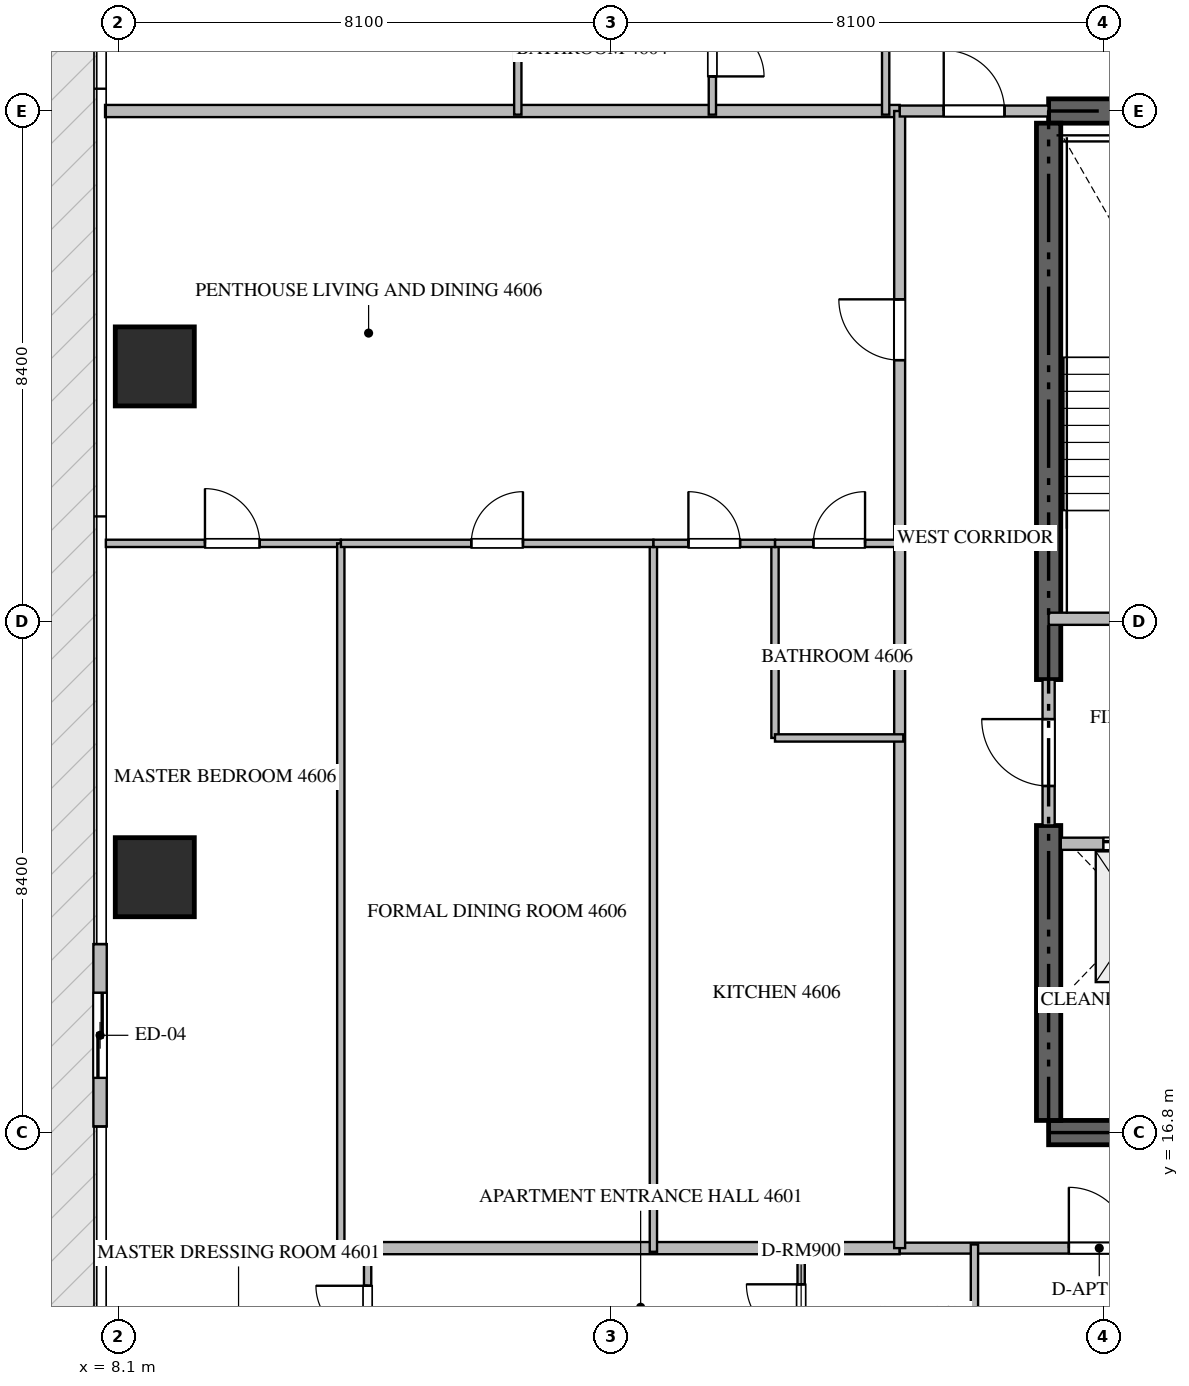
"""IFC4 building model, lengths in metres.
Left out: names, types, materials, properties, quantities, classifications, styles, units other than length and angle.
Written with IfcOpenShell. Run it as: python <this file> out.ifc"""

import sys

from ifc_helpers import new_model, si_unit, direction, frame, frame_2d, origin, origin_2d, place, context, subcontext, project, spatial, rectangle, extrude, source, transform, mapped, element, fill, save


model = new_model("IFC4")
c1 = context("Model", 3, precision=1e-05, world=origin(), true_north=direction((0.0, 1.0)))
c2 = subcontext(c1, "Body", "Model", "MODEL_VIEW")
j1 = project(units=[si_unit("LENGTHUNIT", "METRE"), si_unit("PLANEANGLEUNIT", "RADIAN")], contexts=[c1])
p1 = place(None, origin())
s1 = spatial("IfcSite", under=j1, at=p1, CompositionType="ELEMENT")
p2 = place(p1, origin())
s2 = spatial("IfcBuilding", under=s1, at=p2, CompositionType="ELEMENT")
p3 = place(p2, frame((0.0, 0.0, 183.9)))
s3 = spatial("IfcBuildingStorey", under=s2, at=p3, CompositionType="ELEMENT", Elevation=183.9)
for number, where, z_axis, x_axis in (
    (1, (23.4, 16.8, -0.26), (0.0, 0.0, 1.0), (1.0, 0.0, 0.0)),
    (2, (41.4, 33.6, -0.26), (0.0, 0.0, 1.0), (-1.0, 0.0, 0.0)),
):
    element("IfcWall", number, at=place(p3, frame(where, z_axis=z_axis, x_axis=x_axis)), inside=s3, PredefinedType="SHEAR", context=c2, shape_type="SweptSolid", body=[
        extrude(rectangle(XDim=18.0, YDim=0.4, at=frame_2d((9.0, 0.0))), origin(), (0.0, 0.0, 1.0), 3.748),
    ])
p4 = place(p3, frame((23.4, 17.0, -0.26), z_axis=(0.0, 0.0, 1.0), x_axis=(0.0, 1.0, 0.0)))
e3 = element("IfcWall", 3, at=p4, inside=s3, PredefinedType="SHEAR", context=c2, shape_type="SweptSolid", body=[
    extrude(rectangle(XDim=4.85, YDim=0.4, at=frame_2d((2.425, 0.0))), origin(), (0.0, 0.0, 1.0), 3.748),
])
p5 = place(p3, frame((23.4, 24.25, -0.26), z_axis=(0.0, 0.0, 1.0), x_axis=(0.0, 1.0, 0.0)))
e4 = element("IfcWall", 4, at=p5, inside=s3, PredefinedType="SHEAR", context=c2, shape_type="SweptSolid", body=[
    extrude(rectangle(XDim=9.15, YDim=0.4, at=frame_2d((4.575, 0.0))), origin(), (0.0, 0.0, 1.0), 3.748),
])
m1 = source(origin(), c2, "Body", "SweptSolid", [
    extrude(rectangle(XDim=1.3, YDim=1.3, at=origin_2d()), origin(), (0.0, 0.0, 1.0), 3.75),
])
for number, where, z_axis, x_axis in (
    (5, (8.7, 21.0, -0.26), (0.0, 0.0, 1.0), (1.0, 0.0, 0.0)),
    (6, (8.7, 29.4, -0.26), (0.0, 0.0, 1.0), (1.0, 0.0, 0.0)),
):
    element("IfcColumn", number, at=place(p3, frame(where, z_axis=z_axis, x_axis=x_axis)), inside=s3, PredefinedType="COLUMN", context=c2, shape_type="MappedRepresentation", body=[
        mapped(m1, transform((0.0, 0.0, 0.0), scale=1.0)),
    ])
p6 = place(p3, frame((7.8, 19.9, 0.0), z_axis=(0.0, 0.0, 1.0), x_axis=(0.0, -1.0, 0.0)))
e7 = element("IfcWall", 7, at=p6, inside=s3, PredefinedType="ELEMENTEDWALL", context=c2, shape_type="SweptSolid", body=[
    extrude(rectangle(XDim=3.0, YDim=0.22, at=frame_2d((1.5, 0.0))), origin(), (0.0, 0.0, 1.0), 3.475),
])
p7 = place(p6, frame((0.8, 0.0, 0.0)))
e8 = element("IfcOpeningElement", 8, at=p7, cuts=e7, PredefinedType="OPENING", context=c2, shape_type="SweptSolid", body=[
    extrude(rectangle(XDim=1.4, YDim=2.25, at=frame_2d((0.7, 1.125))), frame((0.0, 0.12, 0.0), z_axis=(0.0, -1.0, 0.0), x_axis=(1.0, 0.0, 0.0)), (0.0, 0.0, 1.0), 0.24),
])
p8 = place(p3, frame((23.4, 25.25, 0.0), z_axis=(0.0, 0.0, 1.0), x_axis=(1.0, 0.0, 0.0)))
e9 = element("IfcWall", 9, at=p8, inside=s3, PredefinedType="STANDARD", context=c2, shape_type="SweptSolid", body=[
    extrude(rectangle(XDim=4.45, YDim=0.2, at=frame_2d((2.225, 0.0))), origin(), (0.0, 0.0, 1.0), 3.49),
])
p9 = place(p8, frame((1.65, 0.0, 0.0)))
e10 = element("IfcOpeningElement", 10, at=p9, cuts=e9, PredefinedType="OPENING", context=c2, shape_type="SweptSolid", body=[
    extrude(rectangle(XDim=1.1, YDim=2.15, at=frame_2d((0.55, 1.075))), frame((0.0, 0.11, 0.0), z_axis=(0.0, -1.0, 0.0), x_axis=(1.0, 0.0, 0.0)), (0.0, 0.0, 1.0), 0.22),
])
p10 = place(p3, frame((23.6, 21.55, 0.0), z_axis=(0.0, 0.0, 1.0), x_axis=(1.0, 0.0, 0.0)))
e11 = element("IfcWall", 11, at=p10, inside=s3, PredefinedType="STANDARD", context=c2, shape_type="SweptSolid", body=[
    extrude(rectangle(XDim=2.45, YDim=0.2, at=frame_2d((1.225, 0.0))), origin(), (0.0, 0.0, 1.0), 3.49),
])
p11 = place(p10, frame((0.7, 0.0, 0.0)))
e12 = element("IfcOpeningElement", 12, at=p11, cuts=e11, PredefinedType="OPENING", context=c2, shape_type="SweptSolid", body=[
    extrude(rectangle(XDim=1.2, YDim=2.2, at=frame_2d((0.6, 1.1))), frame((0.0, 0.11, 0.0), z_axis=(0.0, -1.0, 0.0), x_axis=(1.0, 0.0, 0.0)), (0.0, 0.0, 1.0), 0.22),
])
p12 = place(p3, frame((23.6, 19.05, 0.0), z_axis=(0.0, 0.0, 1.0), x_axis=(1.0, 0.0, 0.0)))
e13 = element("IfcWall", 13, at=p12, inside=s3, PredefinedType="STANDARD", context=c2, shape_type="SweptSolid", body=[
    extrude(rectangle(XDim=2.45, YDim=0.2, at=frame_2d((1.225, 0.0))), origin(), (0.0, 0.0, 1.0), 3.49),
])
p13 = place(p3, frame((23.4, 21.852, 0.0), z_axis=(0.0, 0.0, 1.0), x_axis=(0.0, 1.0, 0.0)))
e14 = element("IfcWall", 14, at=p13, inside=s3, PredefinedType="STANDARD", context=c2, shape_type="SweptSolid", body=[
    extrude(rectangle(XDim=2.396, YDim=0.2, at=frame_2d((1.198, 0.0))), origin(), (0.0, 0.0, 1.0), 3.49),
])
p14 = place(p13, frame((0.648, 0.0, 0.0)))
e15 = element("IfcOpeningElement", 15, at=p14, cuts=e14, PredefinedType="OPENING", context=c2, shape_type="SweptSolid", body=[
    extrude(rectangle(XDim=1.1, YDim=2.15, at=frame_2d((0.55, 1.075))), frame((0.0, 0.11, 0.0), z_axis=(0.0, -1.0, 0.0), x_axis=(1.0, 0.0, 0.0)), (0.0, 0.0, 1.0), 0.22),
])
for number, where, z_axis, x_axis in (
    (16, (7.882, 14.9, 0.0), (0.0, 0.0, 1.0), (1.0, 0.0, 0.0)),
    (17, (7.882, 33.6, 0.0), (0.0, 0.0, 1.0), (1.0, 0.0, 0.0)),
):
    element("IfcWall", number, at=place(p3, frame(where, z_axis=z_axis, x_axis=x_axis)), inside=s3, PredefinedType="PARTITIONING", context=c2, shape_type="SweptSolid", body=[
        extrude(rectangle(XDim=13.068, YDim=0.2, at=frame_2d((6.534, 0.0))), origin(), (0.0, 0.0, 1.0), 3.49),
    ])
p15 = place(p3, frame((20.952, 14.9, 0.0), z_axis=(0.0, 0.0, 1.0), x_axis=(1.0, 0.0, 0.0)))
e18 = element("IfcWall", 18, at=p15, inside=s3, PredefinedType="PARTITIONING", context=c2, shape_type="SweptSolid", body=[
    extrude(rectangle(XDim=22.896, YDim=0.18, at=frame_2d((11.448, 0.0))), origin(), (0.0, 0.0, 1.0), 3.49),
])
p16 = place(p15, frame((2.781, 0.0, 0.0)))
e19 = element("IfcOpeningElement", 19, at=p16, cuts=e18, PredefinedType="OPENING", context=c2, shape_type="SweptSolid", body=[
    extrude(rectangle(XDim=1.0, YDim=2.15, at=frame_2d((0.5, 1.075))), frame((0.0, 0.1, 0.0), z_axis=(0.0, -1.0, 0.0), x_axis=(1.0, 0.0, 0.0)), (0.0, 0.0, 1.0), 0.2),
])
p17 = place(p15, frame((14.736, 0.0, 0.0)))
e20 = element("IfcOpeningElement", 20, at=p17, cuts=e18, PredefinedType="OPENING", context=c2, shape_type="SweptSolid", body=[
    extrude(rectangle(XDim=1.0, YDim=2.15, at=frame_2d((0.5, 1.075))), frame((0.0, 0.1, 0.0), z_axis=(0.0, -1.0, 0.0), x_axis=(1.0, 0.0, 0.0)), (0.0, 0.0, 1.0), 0.2),
])
p18 = place(p15, frame((19.115, 0.0, 0.0)))
e21 = element("IfcOpeningElement", 21, at=p18, cuts=e18, PredefinedType="OPENING", context=c2, shape_type="SweptSolid", body=[
    extrude(rectangle(XDim=1.0, YDim=2.15, at=frame_2d((0.5, 1.075))), frame((0.0, 0.1, 0.0), z_axis=(0.0, -1.0, 0.0), x_axis=(1.0, 0.0, 0.0)), (0.0, 0.0, 1.0), 0.2),
])
p19 = place(p3, frame((20.95, 14.9, 0.0), z_axis=(0.0, 0.0, 1.0), x_axis=(0.0, 1.0, 0.0)))
e22 = element("IfcWall", 22, at=p19, inside=s3, PredefinedType="PARTITIONING", context=c2, shape_type="SweptSolid", body=[
    extrude(rectangle(XDim=18.7, YDim=0.18, at=frame_2d((9.35, 0.0))), origin(), (0.0, 0.0, 1.0), 3.49),
])
p20 = place(p19, frame((14.603, 0.0, 0.0)))
e23 = element("IfcOpeningElement", 23, at=p20, cuts=e22, PredefinedType="OPENING", context=c2, shape_type="SweptSolid", body=[
    extrude(rectangle(XDim=1.0, YDim=2.15, at=frame_2d((0.5, 1.075))), frame((0.0, 0.1, 0.0), z_axis=(0.0, -1.0, 0.0), x_axis=(1.0, 0.0, 0.0)), (0.0, 0.0, 1.0), 0.2),
])
p21 = place(p3, frame((20.952, 33.6, 0.0), z_axis=(0.0, 0.0, 1.0), x_axis=(1.0, 0.0, 0.0)))
e24 = element("IfcWall", 24, at=p21, inside=s3, PredefinedType="PARTITIONING", context=c2, shape_type="SweptSolid", body=[
    extrude(rectangle(XDim=2.446, YDim=0.18, at=frame_2d((1.223, 0.0))), origin(), (0.0, 0.0, 1.0), 3.49),
])
p22 = place(p21, frame((0.723, 0.0, 0.0)))
e25 = element("IfcOpeningElement", 25, at=p22, cuts=e24, PredefinedType="OPENING", context=c2, shape_type="SweptSolid", body=[
    extrude(rectangle(XDim=1.0, YDim=2.15, at=frame_2d((0.5, 1.075))), frame((0.0, 0.1, 0.0), z_axis=(0.0, -1.0, 0.0), x_axis=(1.0, 0.0, 0.0)), (0.0, 0.0, 1.0), 0.2),
])
p23 = place(p3, frame((22.18, 12.15, 0.0), z_axis=(0.0, 0.0, 1.0), x_axis=(0.0, 1.0, 0.0)))
e26 = element("IfcWall", 26, at=p23, inside=s3, PredefinedType="PARTITIONING", context=c2, shape_type="SweptSolid", body=[
    extrude(rectangle(XDim=2.81, YDim=0.12, at=frame_2d((1.405, 0.0))), origin(), (0.0, 0.0, 1.0), 3.49),
])
p24 = place(p3, frame((19.33, 12.75, 0.0), z_axis=(0.0, 0.0, 1.0), x_axis=(0.0, 1.0, 0.0)))
e27 = element("IfcWall", 27, at=p24, inside=s3, PredefinedType="PARTITIONING", context=c2, shape_type="SweptSolid", body=[
    extrude(rectangle(XDim=2.21, YDim=0.12, at=frame_2d((1.105, 0.0))), origin(), (0.0, 0.0, 1.0), 3.49),
])
p25 = place(p24, frame((0.655, 0.0, 0.0)))
e28 = element("IfcOpeningElement", 28, at=p25, cuts=e27, PredefinedType="OPENING", context=c2, shape_type="SweptSolid", body=[
    extrude(rectangle(XDim=0.9, YDim=2.1, at=frame_2d((0.45, 1.05))), frame((0.0, 0.07, 0.0), z_axis=(0.0, -1.0, 0.0), x_axis=(1.0, 0.0, 0.0)), (0.0, 0.0, 1.0), 0.14),
])
p26 = place(p3, frame((12.2, 12.752, 0.0), z_axis=(0.0, 0.0, 1.0), x_axis=(0.0, 1.0, 0.0)))
e29 = element("IfcWall", 29, at=p26, inside=s3, PredefinedType="PARTITIONING", context=c2, shape_type="SweptSolid", body=[
    extrude(rectangle(XDim=2.208, YDim=0.12, at=frame_2d((1.104, 0.0))), origin(), (0.0, 0.0, 1.0), 3.49),
])
p27 = place(p26, frame((0.679, 0.0, 0.0)))
e30 = element("IfcOpeningElement", 30, at=p27, cuts=e29, PredefinedType="OPENING", context=c2, shape_type="SweptSolid", body=[
    extrude(rectangle(XDim=0.85, YDim=2.1, at=frame_2d((0.425, 1.05))), frame((0.0, 0.07, 0.0), z_axis=(0.0, -1.0, 0.0), x_axis=(1.0, 0.0, 0.0)), (0.0, 0.0, 1.0), 0.14),
])
p28 = place(p3, frame((20.72, 36.35, 0.0), z_axis=(0.0, 0.0, 1.0), x_axis=(0.0, -1.0, 0.0)))
e31 = element("IfcWall", 31, at=p28, inside=s3, PredefinedType="PARTITIONING", context=c2, shape_type="SweptSolid", body=[
    extrude(rectangle(XDim=2.81, YDim=0.12, at=frame_2d((1.405, 0.0))), origin(), (0.0, 0.0, 1.0), 3.49),
])
p29 = place(p3, frame((14.67, 35.65, 0.0), z_axis=(0.0, 0.0, 1.0), x_axis=(0.0, -1.0, 0.0)))
e32 = element("IfcWall", 32, at=p29, inside=s3, PredefinedType="PARTITIONING", context=c2, shape_type="SweptSolid", body=[
    extrude(rectangle(XDim=2.11, YDim=0.12, at=frame_2d((1.055, 0.0))), origin(), (0.0, 0.0, 1.0), 3.49),
])
p30 = place(p3, frame((17.87, 35.648, 0.0), z_axis=(0.0, 0.0, 1.0), x_axis=(0.0, -1.0, 0.0)))
e33 = element("IfcWall", 33, at=p30, inside=s3, PredefinedType="PARTITIONING", context=c2, shape_type="SweptSolid", body=[
    extrude(rectangle(XDim=2.108, YDim=0.12, at=frame_2d((1.054, 0.0))), origin(), (0.0, 0.0, 1.0), 3.49),
])
p31 = place(p30, frame((0.629, 0.0, 0.0)))
e34 = element("IfcOpeningElement", 34, at=p31, cuts=e33, PredefinedType="OPENING", context=c2, shape_type="SweptSolid", body=[
    extrude(rectangle(XDim=0.85, YDim=2.1, at=frame_2d((0.425, 1.05))), frame((0.0, 0.07, 0.0), z_axis=(0.0, -1.0, 0.0), x_axis=(1.0, 0.0, 0.0)), (0.0, 0.0, 1.0), 0.14),
])
p32 = place(p3, frame((7.895, 26.49, 0.0), z_axis=(0.0, 0.0, 1.0), x_axis=(1.0, 0.0, 0.0)))
e35 = element("IfcWall", 35, at=p32, inside=s3, PredefinedType="PARTITIONING", context=c2, shape_type="SweptSolid", body=[
    extrude(rectangle(XDim=3.864, YDim=0.12, at=frame_2d((1.932, 0.0))), origin(), (0.0, 0.0, 1.0), 3.49),
])
p33 = place(p32, frame((1.63, 0.0, 0.0)))
e36 = element("IfcOpeningElement", 36, at=p33, cuts=e35, PredefinedType="OPENING", context=c2, shape_type="SweptSolid", body=[
    extrude(rectangle(XDim=0.9, YDim=2.1, at=frame_2d((0.45, 1.05))), frame((0.0, 0.07, 0.0), z_axis=(0.0, -1.0, 0.0), x_axis=(1.0, 0.0, 0.0)), (0.0, 0.0, 1.0), 0.14),
])
p34 = place(p3, frame((11.759, 14.84, 0.0), z_axis=(0.0, 0.0, 1.0), x_axis=(0.0, 1.0, 0.0)))
e37 = element("IfcWall", 37, at=p34, inside=s3, PredefinedType="PARTITIONING", context=c2, shape_type="SweptSolid", body=[
    extrude(rectangle(XDim=11.65, YDim=0.12, at=frame_2d((5.825, 0.0))), origin(), (0.0, 0.0, 1.0), 3.49),
])
p35 = place(p3, frame((16.9, 14.84, 0.0), z_axis=(0.0, 0.0, 1.0), x_axis=(0.0, 1.0, 0.0)))
e38 = element("IfcWall", 38, at=p35, inside=s3, PredefinedType="PARTITIONING", context=c2, shape_type="SweptSolid", body=[
    extrude(rectangle(XDim=11.65, YDim=0.12, at=frame_2d((5.825, 0.0))), origin(), (0.0, 0.0, 1.0), 2.972),
])
p36 = place(p3, frame((18.9, 23.29, 0.0), z_axis=(0.0, 0.0, 1.0), x_axis=(0.0, 1.0, 0.0)))
e39 = element("IfcWall", 39, at=p36, inside=s3, PredefinedType="PARTITIONING", context=c2, shape_type="SweptSolid", body=[
    extrude(rectangle(XDim=3.2, YDim=0.12, at=frame_2d((1.6, 0.0))), origin(), (0.0, 0.0, 1.0), 3.49),
])
p37 = place(p3, frame((18.9, 23.29, 0.0), z_axis=(0.0, 0.0, 1.0), x_axis=(1.0, 0.0, 0.0)))
e40 = element("IfcWall", 40, at=p37, inside=s3, PredefinedType="PARTITIONING", context=c2, shape_type="SweptSolid", body=[
    extrude(rectangle(XDim=2.11, YDim=0.12, at=frame_2d((1.055, 0.0))), origin(), (0.0, 0.0, 1.0), 3.49),
])
p38 = place(p3, frame((11.761, 26.49, 0.0), z_axis=(0.0, 0.0, 1.0), x_axis=(1.0, 0.0, 0.0)))
e41 = element("IfcWall", 41, at=p38, inside=s3, PredefinedType="PARTITIONING", context=c2, shape_type="SweptSolid", body=[
    extrude(rectangle(XDim=5.139, YDim=0.12, at=frame_2d((2.569, 0.0))), origin(), (0.0, 0.0, 1.0), 3.49),
])
p39 = place(p38, frame((2.144, 0.0, 0.0)))
e42 = element("IfcOpeningElement", 42, at=p39, cuts=e41, PredefinedType="OPENING", context=c2, shape_type="SweptSolid", body=[
    extrude(rectangle(XDim=0.85, YDim=2.1, at=frame_2d((0.425, 1.05))), frame((0.0, 0.07, 0.0), z_axis=(0.0, -1.0, 0.0), x_axis=(1.0, 0.0, 0.0)), (0.0, 0.0, 1.0), 0.14),
])
p40 = place(p3, frame((16.902, 26.49, 0.0), z_axis=(0.0, 0.0, 1.0), x_axis=(1.0, 0.0, 0.0)))
e43 = element("IfcWall", 43, at=p40, inside=s3, PredefinedType="PARTITIONING", context=c2, shape_type="SweptSolid", body=[
    extrude(rectangle(XDim=1.998, YDim=0.12, at=frame_2d((0.999, 0.0))), origin(), (0.0, 0.0, 1.0), 3.49),
])
p41 = place(p40, frame((0.574, 0.0, 0.0)))
e44 = element("IfcOpeningElement", 44, at=p41, cuts=e43, PredefinedType="OPENING", context=c2, shape_type="SweptSolid", body=[
    extrude(rectangle(XDim=0.85, YDim=2.1, at=frame_2d((0.425, 1.05))), frame((0.0, 0.07, 0.0), z_axis=(0.0, -1.0, 0.0), x_axis=(1.0, 0.0, 0.0)), (0.0, 0.0, 1.0), 0.14),
])
p42 = place(p3, frame((18.902, 26.49, 0.0), z_axis=(0.0, 0.0, 1.0), x_axis=(1.0, 0.0, 0.0)))
e45 = element("IfcWall", 45, at=p42, inside=s3, PredefinedType="PARTITIONING", context=c2, shape_type="SweptSolid", body=[
    extrude(rectangle(XDim=2.108, YDim=0.12, at=frame_2d((1.054, 0.0))), origin(), (0.0, 0.0, 1.0), 3.49),
])
p43 = place(p42, frame((0.629, 0.0, 0.0)))
e46 = element("IfcOpeningElement", 46, at=p43, cuts=e45, PredefinedType="OPENING", context=c2, shape_type="SweptSolid", body=[
    extrude(rectangle(XDim=0.85, YDim=2.1, at=frame_2d((0.425, 1.05))), frame((0.0, 0.07, 0.0), z_axis=(0.0, -1.0, 0.0), x_axis=(1.0, 0.0, 0.0)), (0.0, 0.0, 1.0), 0.14),
])
m2 = source(origin(), c2, "Body", "SweptSolid", [
    extrude(rectangle(XDim=1.4, YDim=2.25, at=frame_2d((0.7, 1.125))), frame((0.0, 0.025, 0.0), z_axis=(0.0, -1.0, 0.0), x_axis=(1.0, 0.0, 0.0)), (0.0, 0.0, 1.0), 0.05),
])
p44 = place(p7, origin())
e47 = element("IfcDoor", 47, at=p44, inside=s3, OperationType="SLIDING_TO_LEFT", PredefinedType="DOOR", context=c2, shape_type="MappedRepresentation", body=[
    mapped(m2, transform((0.0, 0.0, 0.0), scale=1.0)),
])
fill(e8, e47)
m3 = source(origin(), c2, "Body", "SweptSolid", [
    extrude(rectangle(XDim=1.2, YDim=2.2, at=frame_2d((0.6, 1.1))), frame((0.0, 0.025, 0.0), z_axis=(0.0, -1.0, 0.0), x_axis=(1.0, 0.0, 0.0)), (0.0, 0.0, 1.0), 0.05),
])
p45 = place(p11, origin())
e48 = element("IfcDoor", 48, at=p45, inside=s3, OperationType="DOUBLE_DOOR_SLIDING", PredefinedType="DOOR", context=c2, shape_type="MappedRepresentation", body=[
    mapped(m3, transform((0.0, 0.0, 0.0), scale=1.0)),
])
fill(e12, e48)
m4 = source(origin(), c2, "Body", "SweptSolid", [
    extrude(rectangle(XDim=1.1, YDim=2.15, at=frame_2d((0.55, 1.075))), frame((0.0, 0.025, 0.0), z_axis=(0.0, -1.0, 0.0), x_axis=(1.0, 0.0, 0.0)), (0.0, 0.0, 1.0), 0.05),
])
p46 = place(p14, origin())
e49 = element("IfcDoor", 49, at=p46, inside=s3, OperationType="SINGLE_SWING_RIGHT", PredefinedType="DOOR", context=c2, shape_type="MappedRepresentation", body=[
    mapped(m4, transform((0.0, 0.0, 0.0), scale=1.0)),
])
fill(e15, e49)
m5 = source(origin(), c2, "Body", "SweptSolid", [
    extrude(rectangle(XDim=1.0, YDim=2.15, at=frame_2d((0.5, 1.075))), frame((0.0, 0.025, 0.0), z_axis=(0.0, -1.0, 0.0), x_axis=(1.0, 0.0, 0.0)), (0.0, 0.0, 1.0), 0.05),
])
p47 = place(p16, origin())
e50 = element("IfcDoor", 50, at=p47, inside=s3, OperationType="SINGLE_SWING_LEFT", PredefinedType="DOOR", context=c2, shape_type="MappedRepresentation", body=[
    mapped(m5, transform((0.0, 0.0, 0.0), scale=1.0)),
])
fill(e19, e50)
p48 = place(p20, origin())
e51 = element("IfcDoor", 51, at=p48, inside=s3, OperationType="SINGLE_SWING_RIGHT", PredefinedType="DOOR", context=c2, shape_type="MappedRepresentation", body=[
    mapped(m5, transform((0.0, 0.0, 0.0), scale=1.0)),
])
fill(e23, e51)
p49 = place(p22, origin())
e52 = element("IfcDoor", 52, at=p49, inside=s3, OperationType="SINGLE_SWING_LEFT", PredefinedType="DOOR", context=c2, shape_type="MappedRepresentation", body=[
    mapped(m5, transform((0.0, 0.0, 0.0), scale=1.0)),
])
fill(e25, e52)
m6 = source(origin(), c2, "Body", "SweptSolid", [
    extrude(rectangle(XDim=0.9, YDim=2.1, at=frame_2d((0.45, 1.05))), frame((0.0, 0.025, 0.0), z_axis=(0.0, -1.0, 0.0), x_axis=(1.0, 0.0, 0.0)), (0.0, 0.0, 1.0), 0.05),
])
p50 = place(p25, origin())
e53 = element("IfcDoor", 53, at=p50, inside=s3, OperationType="SINGLE_SWING_RIGHT", PredefinedType="DOOR", context=c2, shape_type="MappedRepresentation", body=[
    mapped(m6, transform((0.0, 0.0, 0.0), scale=1.0)),
])
fill(e28, e53)
m7 = source(origin(), c2, "Body", "SweptSolid", [
    extrude(rectangle(XDim=0.85, YDim=2.1, at=frame_2d((0.425, 1.05))), frame((0.0, 0.025, 0.0), z_axis=(0.0, -1.0, 0.0), x_axis=(1.0, 0.0, 0.0)), (0.0, 0.0, 1.0), 0.05),
])
p51 = place(p27, origin())
e54 = element("IfcDoor", 54, at=p51, inside=s3, OperationType="SINGLE_SWING_RIGHT", PredefinedType="DOOR", context=c2, shape_type="MappedRepresentation", body=[
    mapped(m7, transform((0.0, 0.0, 0.0), scale=1.0)),
])
fill(e30, e54)
p52 = place(p31, origin())
e55 = element("IfcDoor", 55, at=p52, inside=s3, OperationType="SINGLE_SWING_RIGHT", PredefinedType="DOOR", context=c2, shape_type="MappedRepresentation", body=[
    mapped(m7, transform((0.0, 0.0, 0.0), scale=1.0)),
])
fill(e34, e55)
p53 = place(p33, origin())
e56 = element("IfcDoor", 56, at=p53, inside=s3, OperationType="SINGLE_SWING_LEFT", PredefinedType="DOOR", context=c2, shape_type="MappedRepresentation", body=[
    mapped(m6, transform((0.0, 0.0, 0.0), scale=1.0)),
])
fill(e36, e56)
p54 = place(p39, origin())
e57 = element("IfcDoor", 57, at=p54, inside=s3, OperationType="SINGLE_SWING_RIGHT", PredefinedType="DOOR", context=c2, shape_type="MappedRepresentation", body=[
    mapped(m7, transform((0.0, 0.0, 0.0), scale=1.0)),
])
fill(e42, e57)
p55 = place(p41, origin())
e58 = element("IfcDoor", 58, at=p55, inside=s3, OperationType="SINGLE_SWING_LEFT", PredefinedType="DOOR", context=c2, shape_type="MappedRepresentation", body=[
    mapped(m7, transform((0.0, 0.0, 0.0), scale=1.0)),
])
fill(e44, e58)
p56 = place(p43, origin())
e59 = element("IfcDoor", 59, at=p56, inside=s3, OperationType="SINGLE_SWING_RIGHT", PredefinedType="DOOR", context=c2, shape_type="MappedRepresentation", body=[
    mapped(m7, transform((0.0, 0.0, 0.0), scale=1.0)),
])
fill(e46, e59)
save(model, sys.argv[1])
